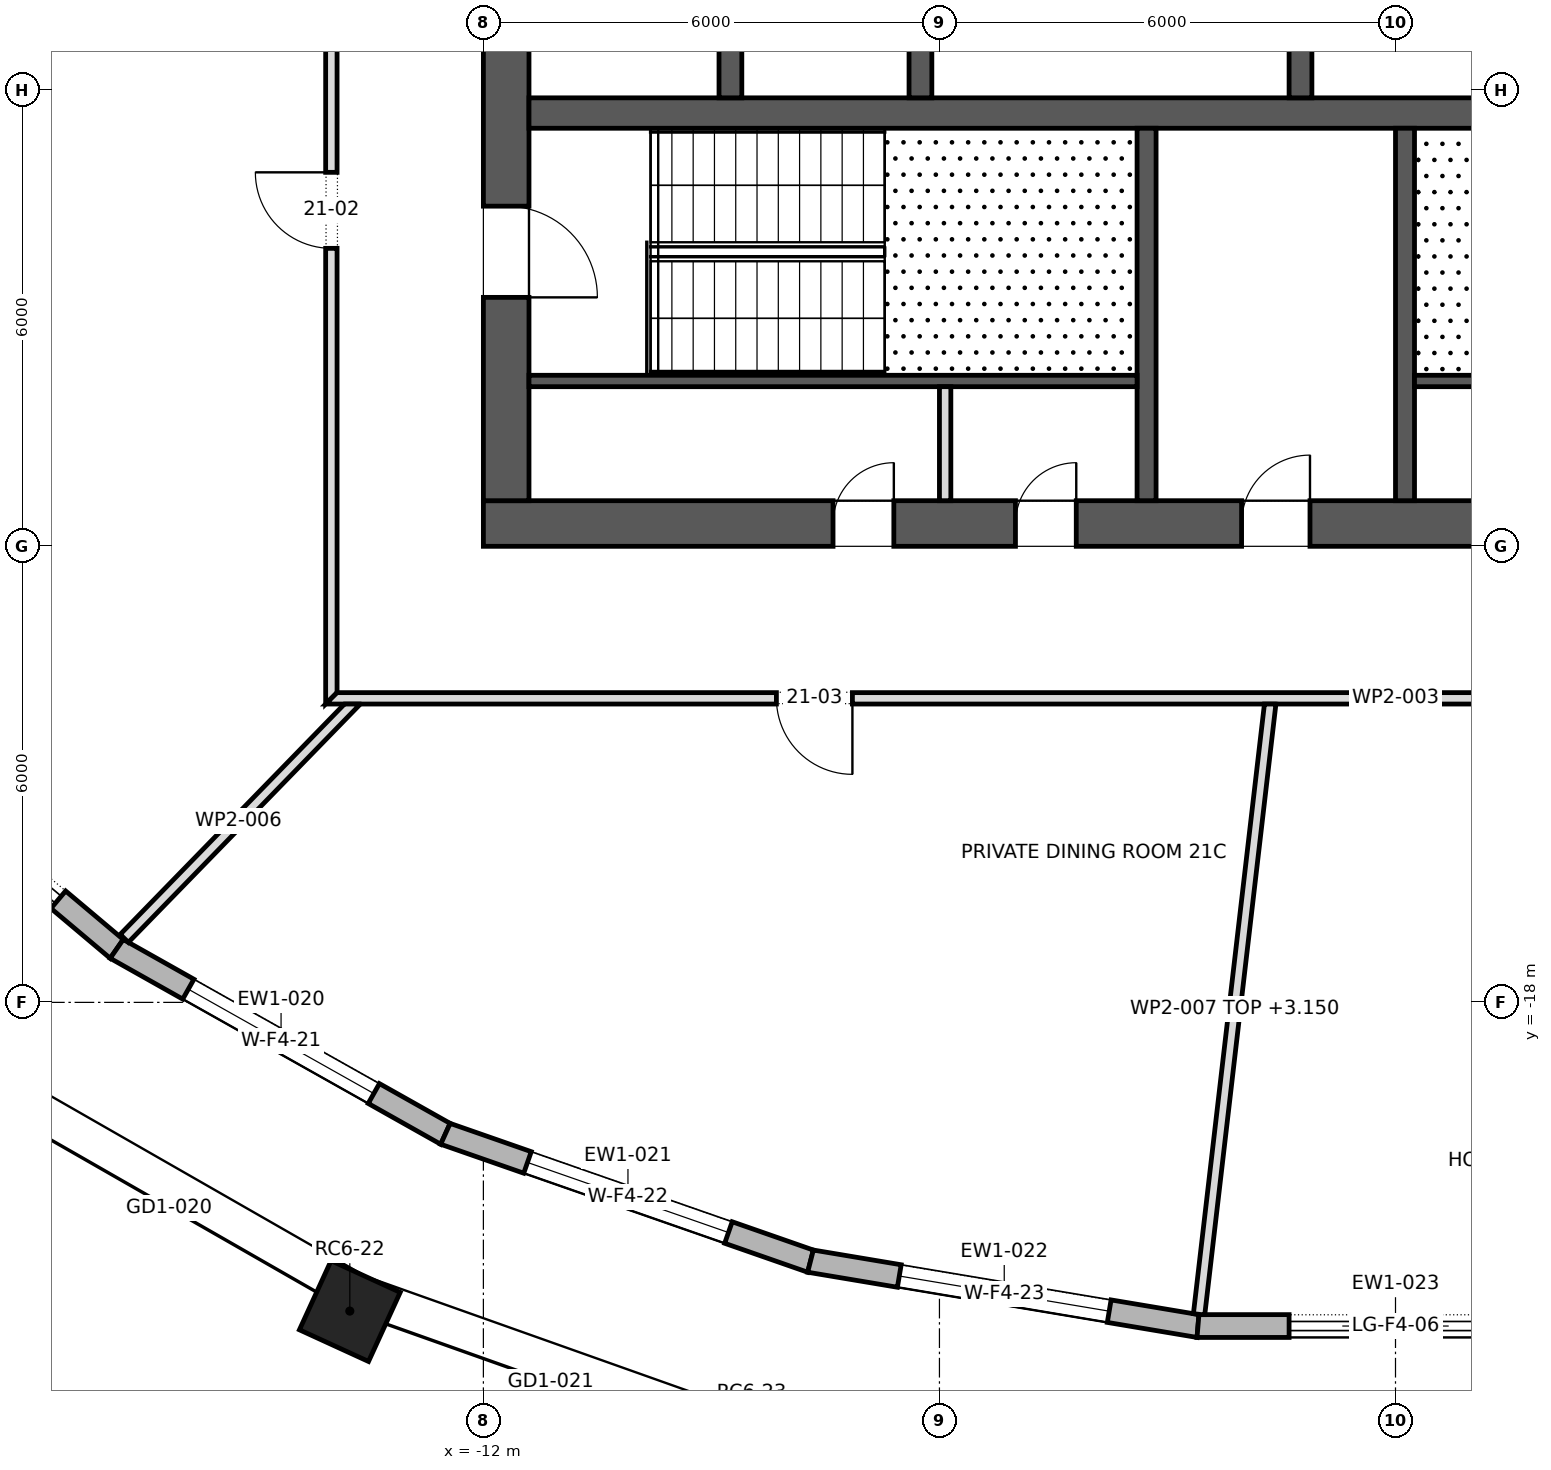
"""IFC4 building model, lengths in metres.
Left out: names, types, materials, properties, quantities, classifications, styles, units other than length and angle.
Written with IfcOpenShell. Run it as: python <this file> out.ifc"""

import sys

from ifc_helpers import new_model, si_unit, direction, frame, frame_2d, origin, origin_2d, place, context, subcontext, project, spatial, polyline, rectangle, outline, extrude, element, fill, save


model = new_model("IFC4")
c1 = context("Model", 3, precision=1e-05, world=origin(), true_north=direction((0.0, 1.0)))
c2 = subcontext(c1, "Body", "Model", "MODEL_VIEW")
j1 = project(units=[si_unit("LENGTHUNIT", "METRE"), si_unit("PLANEANGLEUNIT", "RADIAN")], contexts=[c1])
p1 = place(None, origin())
s1 = spatial("IfcSite", under=j1, at=p1, CompositionType="ELEMENT")
p2 = place(p1, origin())
s2 = spatial("IfcBuilding", under=s1, at=p2, CompositionType="ELEMENT")
p3 = place(p2, frame((0.0, 0.0, 292.3)))
s3 = spatial("IfcBuildingStorey", under=s2, at=p3, CompositionType="ELEMENT", Elevation=292.3)
p4 = place(p3, frame((-13.757, -22.061, 0.0), z_axis=(0.0, 0.0, 1.0), x_axis=(0.909128549752, -0.416515641994, 0.0)))
e1 = element("IfcColumn", 1, at=p4, inside=s3, PredefinedType="COLUMN", context=c2, shape_type="SweptSolid", body=[
    extrude(rectangle(XDim=1.0, YDim=1.0, at=origin_2d()), origin(), (0.0, 0.0, 1.0), 4.0),
])
p5 = place(p3, frame((-12.0, -11.7, 0.0), z_axis=(0.0, 0.0, 1.0), x_axis=(1.0, 0.0, 0.0)))
e2 = element("IfcWall", 2, at=p5, inside=s3, PredefinedType="SHEAR", context=c2, shape_type="SweptSolid", body=[
    extrude(rectangle(XDim=24.0, YDim=0.6, at=frame_2d((12.0, 0.0))), origin(), (0.0, 0.0, 1.0), 4.0),
])
p6 = place(p5, frame((9.975, 0.0, 0.0)))
e3 = element("IfcOpeningElement", 3, at=p6, cuts=e2, PredefinedType="OPENING", context=c2, shape_type="SweptSolid", body=[
    extrude(rectangle(XDim=0.9, YDim=2.1, at=frame_2d((0.45, 1.05))), frame((0.0, 0.312, 0.0), z_axis=(0.0, -1.0, 0.0), x_axis=(1.0, 0.0, 0.0)), (0.0, 0.0, 1.0), 0.624),
])
p7 = place(p5, frame((4.6, 0.0, 0.0)))
e4 = element("IfcOpeningElement", 4, at=p7, cuts=e2, PredefinedType="OPENING", context=c2, shape_type="SweptSolid", body=[
    extrude(rectangle(XDim=0.8, YDim=2.1, at=frame_2d((0.4, 1.05))), frame((0.0, 0.312, 0.0), z_axis=(0.0, -1.0, 0.0), x_axis=(1.0, 0.0, 0.0)), (0.0, 0.0, 1.0), 0.624),
])
p8 = place(p5, frame((7.0, 0.0, 0.0)))
e5 = element("IfcOpeningElement", 5, at=p8, cuts=e2, PredefinedType="OPENING", context=c2, shape_type="SweptSolid", body=[
    extrude(rectangle(XDim=0.8, YDim=2.1, at=frame_2d((0.4, 1.05))), frame((0.0, 0.312, 0.0), z_axis=(0.0, -1.0, 0.0), x_axis=(1.0, 0.0, 0.0)), (0.0, 0.0, 1.0), 0.624),
])
p9 = place(p5, frame((15.85, 0.0, 0.0)))
e6 = element("IfcOpeningElement", 6, at=p9, cuts=e2, PredefinedType="OPENING", context=c2, shape_type="SweptSolid", body=[
    extrude(rectangle(XDim=0.8, YDim=2.1, at=frame_2d((0.4, 1.05))), frame((0.0, 0.312, 0.0), z_axis=(0.0, -1.0, 0.0), x_axis=(1.0, 0.0, 0.0)), (0.0, 0.0, 1.0), 0.624),
])
p10 = place(p3, frame((-11.7, -11.4, 0.0), z_axis=(0.0, 0.0, 1.0), x_axis=(0.0, 1.0, 0.0)))
e7 = element("IfcWall", 7, at=p10, inside=s3, PredefinedType="SHEAR", context=c2, shape_type="SweptSolid", body=[
    extrude(rectangle(XDim=22.8, YDim=0.6, at=frame_2d((11.4, 0.0))), origin(), (0.0, 0.0, 1.0), 4.0),
])
p11 = place(p10, frame((10.2, 0.0, 0.0)))
e8 = element("IfcOpeningElement", 8, at=p11, cuts=e7, PredefinedType="OPENING", context=c2, shape_type="SweptSolid", body=[
    extrude(rectangle(XDim=2.4, YDim=2.1, at=frame_2d((1.2, 1.05))), frame((0.0, 0.312, 0.0), z_axis=(0.0, -1.0, 0.0), x_axis=(1.0, 0.0, 0.0)), (0.0, 0.0, 1.0), 0.624),
])
p12 = place(p10, frame((18.925, 0.0, 0.0)))
e9 = element("IfcOpeningElement", 9, at=p12, cuts=e7, PredefinedType="OPENING", context=c2, shape_type="SweptSolid", body=[
    extrude(rectangle(XDim=1.2, YDim=2.1, at=frame_2d((0.6, 1.05))), frame((0.0, 0.312, 0.0), z_axis=(0.0, -1.0, 0.0), x_axis=(1.0, 0.0, 0.0)), (0.0, 0.0, 1.0), 0.624),
])
p13 = place(p10, frame((2.675, 0.0, 0.0)))
e10 = element("IfcOpeningElement", 10, at=p13, cuts=e7, PredefinedType="OPENING", context=c2, shape_type="SweptSolid", body=[
    extrude(rectangle(XDim=1.2, YDim=2.1, at=frame_2d((0.6, 1.05))), frame((0.0, 0.312, 0.0), z_axis=(0.0, -1.0, 0.0), x_axis=(1.0, 0.0, 0.0)), (0.0, 0.0, 1.0), 0.624),
])
p14 = place(p3, frame((-11.4, -6.3, 0.0), z_axis=(0.0, 0.0, 1.0), x_axis=(1.0, 0.0, 0.0)))
e11 = element("IfcWall", 11, at=p14, inside=s3, PredefinedType="SHEAR", context=c2, shape_type="SweptSolid", body=[
    extrude(rectangle(XDim=22.8, YDim=0.4, at=frame_2d((11.4, 0.0))), origin(), (0.0, 0.0, 1.0), 4.0),
])
p15 = place(p14, frame((20.85, 0.0, 0.0)))
e12 = element("IfcOpeningElement", 12, at=p15, cuts=e11, PredefinedType="OPENING", context=c2, shape_type="SweptSolid", body=[
    extrude(rectangle(XDim=1.1, YDim=2.1, at=frame_2d((0.55, 1.05))), frame((0.0, 0.212, 0.0), z_axis=(0.0, -1.0, 0.0), x_axis=(1.0, 0.0, 0.0)), (0.0, 0.0, 1.0), 0.424),
])
for number, where, z_axis, x_axis in (
    (13, (-8.75, -6.1, 0.0), (0.0, 0.0, 1.0), (0.0, 1.0, 0.0)),
    (14, (-6.25, -6.1, 0.0), (0.0, 0.0, 1.0), (0.0, 1.0, 0.0)),
    (15, (-1.25, -6.1, 0.0), (0.0, 0.0, 1.0), (0.0, 1.0, 0.0)),
):
    element("IfcWall", number, at=place(p3, frame(where, z_axis=z_axis, x_axis=x_axis)), inside=s3, PredefinedType="SHEAR", context=c2, shape_type="SweptSolid", body=[
        extrude(rectangle(XDim=2.9, YDim=0.3, at=frame_2d((1.45, 0.0))), origin(), (0.0, 0.0, 1.0), 4.0),
    ])
p16 = place(p3, frame((-20.503, -14.198, 0.0), z_axis=(0.0, 0.0, 1.0), x_axis=(0.764966473721, -0.644070100286, 0.0)))
e16 = element("IfcWall", 16, at=p16, inside=s3, PredefinedType="STANDARD", context=c2, shape_type="SweptSolid", body=[
    extrude(outline(polyline([(-0.015, -0.15), (4.824, -0.15), (4.796, 0.15), (0.015, 0.15), (-0.015, -0.15)])), origin(), (0.0, 0.0, 1.0), 3.7),
])
p17 = place(p16, frame((1.005, 0.0, 0.0)))
e17 = element("IfcOpeningElement", 17, at=p17, cuts=e16, PredefinedType="OPENING", context=c2, shape_type="SweptSolid", body=[
    extrude(rectangle(XDim=2.8, YDim=3.25, at=frame_2d((1.4, 1.625))), frame((0.0, 0.162, 0.0), z_axis=(0.0, -1.0, 0.0), x_axis=(1.0, 0.0, 0.0)), (0.0, 0.0, 1.0), 0.324),
])
p18 = place(p3, frame((-16.824, -17.296, 0.0), z_axis=(0.0, 0.0, 1.0), x_axis=(0.871512454536, -0.490373369575, 0.0)))
e18 = element("IfcWall", 18, at=p18, inside=s3, PredefinedType="STANDARD", context=c2, shape_type="SweptSolid", body=[
    extrude(outline(polyline([(-0.014, -0.15), (4.975, -0.15), (4.948, 0.15), (0.014, 0.15), (-0.014, -0.15)])), origin(), (0.0, 0.0, 1.0), 3.7),
])
p19 = place(p18, frame((1.081, 0.0, 0.6)))
e19 = element("IfcOpeningElement", 19, at=p19, cuts=e18, PredefinedType="OPENING", context=c2, shape_type="SweptSolid", body=[
    extrude(rectangle(XDim=2.8, YDim=2.65, at=frame_2d((1.4, 1.325))), frame((0.0, 0.162, 0.0), z_axis=(0.0, -1.0, 0.0), x_axis=(1.0, 0.0, 0.0)), (0.0, 0.0, 1.0), 0.324),
])
p20 = place(p3, frame((-12.5, -19.729, 0.0), z_axis=(0.0, 0.0, 1.0), x_axis=(0.944230376095, -0.329285585564, 0.0)))
e20 = element("IfcWall", 20, at=p20, inside=s3, PredefinedType="STANDARD", context=c2, shape_type="SweptSolid", body=[
    extrude(outline(polyline([(-0.013, -0.15), (5.1, -0.15), (5.074, 0.15), (0.013, 0.15), (-0.013, -0.15)])), origin(), (0.0, 0.0, 1.0), 3.7),
])
p21 = place(p20, frame((1.143, 0.0, 0.6)))
e21 = element("IfcOpeningElement", 21, at=p21, cuts=e20, PredefinedType="OPENING", context=c2, shape_type="SweptSolid", body=[
    extrude(rectangle(XDim=2.8, YDim=2.65, at=frame_2d((1.4, 1.325))), frame((0.0, 0.162, 0.0), z_axis=(0.0, -1.0, 0.0), x_axis=(1.0, 0.0, 0.0)), (0.0, 0.0, 1.0), 0.324),
])
p22 = place(p3, frame((-7.696, -21.404, 0.0), z_axis=(0.0, 0.0, 1.0), x_axis=(0.986263399459, -0.165180225475, 0.0)))
e22 = element("IfcWall", 22, at=p22, inside=s3, PredefinedType="STANDARD", context=c2, shape_type="SweptSolid", body=[
    extrude(outline(polyline([(-0.013, -0.15), (5.181, -0.15), (5.156, 0.15), (0.013, 0.15), (-0.013, -0.15)])), origin(), (0.0, 0.0, 1.0), 3.7),
])
p23 = place(p22, frame((1.184, 0.0, 0.6)))
e23 = element("IfcOpeningElement", 23, at=p23, cuts=e22, PredefinedType="OPENING", context=c2, shape_type="SweptSolid", body=[
    extrude(rectangle(XDim=2.8, YDim=2.65, at=frame_2d((1.4, 1.325))), frame((0.0, 0.162, 0.0), z_axis=(0.0, -1.0, 0.0), x_axis=(1.0, 0.0, 0.0)), (0.0, 0.0, 1.0), 0.324),
])
p24 = place(p3, frame((-2.599, -22.258, 0.0), z_axis=(0.0, 0.0, 1.0), x_axis=(1.0, 0.0, 0.0)))
e24 = element("IfcWall", 24, at=p24, inside=s3, PredefinedType="STANDARD", context=c2, shape_type="SweptSolid", body=[
    extrude(outline(polyline([(-0.012, -0.15), (5.21, -0.15), (5.185, 0.15), (0.012, 0.15), (-0.012, -0.15)])), origin(), (0.0, 0.0, 1.0), 3.7),
])
p25 = place(p24, frame((1.198, 0.0, 0.0)))
e25 = element("IfcOpeningElement", 25, at=p25, cuts=e24, PredefinedType="OPENING", context=c2, shape_type="SweptSolid", body=[
    extrude(rectangle(XDim=2.8, YDim=3.25, at=frame_2d((1.4, 1.625))), frame((0.0, 0.162, 0.0), z_axis=(0.0, -1.0, 0.0), x_axis=(1.0, 0.0, 0.0)), (0.0, 0.0, 1.0), 0.324),
])
for number, where, z_axis, x_axis in (
    (26, (-3.275, -11.4, 0.0), (0.0, 0.0, 1.0), (0.0, 1.0, 0.0)),
    (27, (0.125, -11.4, 0.0), (0.0, 0.0, 1.0), (0.0, 1.0, 0.0)),
):
    element("IfcWall", number, at=place(p3, frame(where, z_axis=z_axis, x_axis=x_axis)), inside=s3, PredefinedType="SHEAR", context=c2, shape_type="SweptSolid", body=[
        extrude(rectangle(XDim=4.9, YDim=0.25, at=frame_2d((2.45, 0.0))), origin(), (0.0, 0.0, 1.0), 3.7),
    ])
for number, where, z_axis, x_axis in (
    (28, (-11.4, -9.825, 0.0), (0.0, 0.0, 1.0), (1.0, 0.0, 0.0)),
    (29, (0.25, -9.825, 0.0), (0.0, 0.0, 1.0), (1.0, 0.0, 0.0)),
):
    element("IfcWall", number, at=place(p3, frame(where, z_axis=z_axis, x_axis=x_axis)), inside=s3, PredefinedType="SHEAR", context=c2, shape_type="SweptSolid", body=[
        extrude(rectangle(XDim=8.0, YDim=0.15, at=frame_2d((4.0, 0.0))), origin(), (0.0, 0.0, 1.0), 3.7),
    ])
p26 = place(p3, frame((-5.925, -11.4, 0.0), z_axis=(0.0, 0.0, 1.0), x_axis=(0.0, 1.0, 0.0)))
e30 = element("IfcWall", 30, at=p26, inside=s3, PredefinedType="PARTITIONING", context=c2, shape_type="SweptSolid", body=[
    extrude(rectangle(XDim=1.5, YDim=0.15, at=frame_2d((0.75, 0.0))), origin(), (0.0, 0.0, 1.0), 3.7),
])
p27 = place(p3, frame((-14.0, -14.075, 0.0), z_axis=(0.0, 0.0, 1.0), x_axis=(0.0, 1.0, 0.0)))
e31 = element("IfcWall", 31, at=p27, inside=s3, PredefinedType="PARTITIONING", context=c2, shape_type="SweptSolid", body=[
    extrude(outline(polyline([(0.15, -0.075), (2.139, -0.075), (4.128, -0.075), (6.118, -0.075), (8.107, -0.075), (10.096, -0.075), (12.086, -0.075), (14.075, -0.075), (16.064, -0.075), (18.053, -0.075), (20.043, -0.075), (22.032, -0.075), (24.021, -0.075), (26.011, -0.075), (28.0, -0.075), (28.15, 0.075), (26.273, 0.075), (24.396, 0.075), (22.52, 0.075), (20.643, 0.075), (18.767, 0.075), (16.89, 0.075), (15.013, 0.075), (13.137, 0.075), (11.26, 0.075), (9.383, 0.075), (7.507, 0.075), (5.63, 0.075), (3.753, 0.075), (1.877, 0.075), (0.0, 0.075), (0.15, -0.075)])), origin(), (0.0, 0.0, 1.0), 3.7),
])
p28 = place(p27, frame((17.43, 0.0, 0.0)))
e32 = element("IfcOpeningElement", 32, at=p28, cuts=e31, PredefinedType="OPENING", context=c2, shape_type="SweptSolid", body=[
    extrude(rectangle(XDim=1.8, YDim=2.1, at=frame_2d((0.9, 1.05))), frame((0.0, 0.087, 0.0), z_axis=(0.0, -1.0, 0.0), x_axis=(1.0, 0.0, 0.0)), (0.0, 0.0, 1.0), 0.174),
])
p29 = place(p27, frame((5.995, 0.0, 0.0)))
e33 = element("IfcOpeningElement", 33, at=p29, cuts=e31, PredefinedType="OPENING", context=c2, shape_type="SweptSolid", body=[
    extrude(rectangle(XDim=1.0, YDim=2.1, at=frame_2d((0.5, 1.05))), frame((0.0, 0.087, 0.0), z_axis=(0.0, -1.0, 0.0), x_axis=(1.0, 0.0, 0.0)), (0.0, 0.0, 1.0), 0.174),
])
p30 = place(p3, frame((-14.075, -14.0, 0.0), z_axis=(0.0, 0.0, 1.0), x_axis=(1.0, 0.0, 0.0)))
e34 = element("IfcWall", 34, at=p30, inside=s3, PredefinedType="PARTITIONING", context=c2, shape_type="SweptSolid", body=[
    extrude(outline(polyline([(0.0, -0.075), (1.877, -0.075), (3.753, -0.075), (5.63, -0.075), (7.507, -0.075), (9.383, -0.075), (11.26, -0.075), (13.137, -0.075), (15.013, -0.075), (16.89, -0.075), (18.767, -0.075), (20.643, -0.075), (22.52, -0.075), (24.396, -0.075), (26.273, -0.075), (28.15, -0.075), (28.0, 0.075), (26.011, 0.075), (24.021, 0.075), (22.032, 0.075), (20.043, 0.075), (18.053, 0.075), (16.064, 0.075), (14.075, 0.075), (12.086, 0.075), (10.096, 0.075), (8.107, 0.075), (6.118, 0.075), (4.128, 0.075), (2.139, 0.075), (0.15, 0.075), (0.0, -0.075)])), origin(), (0.0, 0.0, 1.0), 3.7),
])
p31 = place(p30, frame((5.93, 0.0, 0.0)))
e35 = element("IfcOpeningElement", 35, at=p31, cuts=e34, PredefinedType="OPENING", context=c2, shape_type="SweptSolid", body=[
    extrude(rectangle(XDim=1.0, YDim=2.1, at=frame_2d((0.5, 1.05))), frame((0.0, 0.087, 0.0), z_axis=(0.0, -1.0, 0.0), x_axis=(1.0, 0.0, 0.0)), (0.0, 0.0, 1.0), 0.174),
])
p32 = place(p30, frame((17.2, 0.0, 0.0)))
e36 = element("IfcOpeningElement", 36, at=p32, cuts=e34, PredefinedType="OPENING", context=c2, shape_type="SweptSolid", body=[
    extrude(rectangle(XDim=1.0, YDim=2.1, at=frame_2d((0.5, 1.05))), frame((0.0, 0.087, 0.0), z_axis=(0.0, -1.0, 0.0), x_axis=(1.0, 0.0, 0.0)), (0.0, 0.0, 1.0), 0.174),
])
p33 = place(p3, frame((-13.672, -14.023, 0.0), z_axis=(0.0, 0.0, 1.0), x_axis=(-0.697528481307, -0.716557058277, 0.0)))
e37 = element("IfcWall", 37, at=p33, inside=s3, PredefinedType="PARTITIONING", context=c2, shape_type="SweptSolid", body=[
    extrude(outline(polyline([(0.0, 0.075), (0.0, 0.075), (0.146, -0.075), (1.555, -0.075), (2.965, -0.075), (4.375, -0.075), (4.375, 0.075), (2.917, 0.075), (1.458, 0.075), (0.0, 0.075)])), origin(), (0.0, 0.0, 1.0), 3.7),
])
p34 = place(p3, frame((-1.648, -14.066, 0.0), z_axis=(0.0, 0.0, 1.0), x_axis=(-0.115734847025, -0.993280144362, 0.0)))
e38 = element("IfcWall", 38, at=p34, inside=s3, PredefinedType="PARTITIONING", context=c2, shape_type="SweptSolid", body=[
    extrude(outline(polyline([(8.092, -0.075), (8.092, 0.034), (8.087, 0.075), (6.47, 0.075), (4.852, 0.075), (3.235, 0.075), (1.617, 0.075), (0.0, 0.075), (0.0, 0.074), (0.017, -0.075), (1.632, -0.075), (3.247, -0.075), (4.862, -0.075), (6.477, -0.075), (8.092, -0.075)])), origin(), (0.0, 0.0, 1.0), 3.15),
])
p35 = place(p17, origin())
e39 = element("IfcDoor", 39, at=p35, inside=s3, OperationType="DOUBLE_DOOR_SLIDING", PredefinedType="DOOR", context=c2, shape_type="SweptSolid", body=[
    extrude(rectangle(XDim=2.8, YDim=3.25, at=frame_2d((1.4, 1.625))), frame((0.0, 0.025, 0.0), z_axis=(0.0, -1.0, 0.0), x_axis=(1.0, 0.0, 0.0)), (0.0, 0.0, 1.0), 0.05),
])
fill(e17, e39)
p36 = place(p19, origin())
e40 = element("IfcWindow", 40, at=p36, inside=s3, PartitioningType="DOUBLE_PANEL_VERTICAL", PredefinedType="WINDOW", context=c2, shape_type="SweptSolid", body=[
    extrude(rectangle(XDim=2.8, YDim=2.65, at=frame_2d((1.4, 1.325))), frame((0.0, 0.03, 0.0), z_axis=(0.0, -1.0, 0.0), x_axis=(1.0, 0.0, 0.0)), (0.0, 0.0, 1.0), 0.06),
])
fill(e19, e40)
p37 = place(p21, origin())
e41 = element("IfcWindow", 41, at=p37, inside=s3, PartitioningType="DOUBLE_PANEL_VERTICAL", PredefinedType="WINDOW", context=c2, shape_type="SweptSolid", body=[
    extrude(rectangle(XDim=2.8, YDim=2.65, at=frame_2d((1.4, 1.325))), frame((0.0, 0.03, 0.0), z_axis=(0.0, -1.0, 0.0), x_axis=(1.0, 0.0, 0.0)), (0.0, 0.0, 1.0), 0.06),
])
fill(e21, e41)
p38 = place(p23, origin())
e42 = element("IfcWindow", 42, at=p38, inside=s3, PartitioningType="DOUBLE_PANEL_VERTICAL", PredefinedType="WINDOW", context=c2, shape_type="SweptSolid", body=[
    extrude(rectangle(XDim=2.8, YDim=2.65, at=frame_2d((1.4, 1.325))), frame((0.0, 0.03, 0.0), z_axis=(0.0, -1.0, 0.0), x_axis=(1.0, 0.0, 0.0)), (0.0, 0.0, 1.0), 0.06),
])
fill(e23, e42)
p39 = place(p25, origin())
e43 = element("IfcDoor", 43, at=p39, inside=s3, OperationType="DOUBLE_DOOR_SLIDING", PredefinedType="DOOR", context=c2, shape_type="SweptSolid", body=[
    extrude(rectangle(XDim=2.8, YDim=3.25, at=frame_2d((1.4, 1.625))), frame((0.0, 0.025, 0.0), z_axis=(0.0, -1.0, 0.0), x_axis=(1.0, 0.0, 0.0)), (0.0, 0.0, 1.0), 0.05),
])
fill(e25, e43)
p40 = place(p13, frame((1.2, 0.0, 0.0), z_axis=(0.0, 0.0, 1.0), x_axis=(-1.0, 0.0, 0.0)))
e44 = element("IfcDoor", 44, at=p40, inside=s3, OperationType="SINGLE_SWING_LEFT", PredefinedType="DOOR", context=c2, shape_type="SweptSolid", body=[
    extrude(rectangle(XDim=1.2, YDim=2.1, at=frame_2d((0.6, 1.05))), frame((0.0, 0.025, 0.0), z_axis=(0.0, -1.0, 0.0), x_axis=(1.0, 0.0, 0.0)), (0.0, 0.0, 1.0), 0.05),
])
fill(e10, e44)
p41 = place(p6, origin())
e45 = element("IfcDoor", 45, at=p41, inside=s3, OperationType="SINGLE_SWING_LEFT", PredefinedType="DOOR", context=c2, shape_type="SweptSolid", body=[
    extrude(rectangle(XDim=0.9, YDim=2.1, at=frame_2d((0.45, 1.05))), frame((0.0, 0.025, 0.0), z_axis=(0.0, -1.0, 0.0), x_axis=(1.0, 0.0, 0.0)), (0.0, 0.0, 1.0), 0.05),
])
fill(e3, e45)
p42 = place(p7, origin())
e46 = element("IfcDoor", 46, at=p42, inside=s3, OperationType="SINGLE_SWING_LEFT", PredefinedType="DOOR", context=c2, shape_type="SweptSolid", body=[
    extrude(rectangle(XDim=0.8, YDim=2.1, at=frame_2d((0.4, 1.05))), frame((0.0, 0.025, 0.0), z_axis=(0.0, -1.0, 0.0), x_axis=(1.0, 0.0, 0.0)), (0.0, 0.0, 1.0), 0.05),
])
fill(e4, e46)
p43 = place(p8, origin())
e47 = element("IfcDoor", 47, at=p43, inside=s3, OperationType="SINGLE_SWING_LEFT", PredefinedType="DOOR", context=c2, shape_type="SweptSolid", body=[
    extrude(rectangle(XDim=0.8, YDim=2.1, at=frame_2d((0.4, 1.05))), frame((0.0, 0.025, 0.0), z_axis=(0.0, -1.0, 0.0), x_axis=(1.0, 0.0, 0.0)), (0.0, 0.0, 1.0), 0.05),
])
fill(e5, e47)
p44 = place(p29, origin())
e48 = element("IfcDoor", 48, at=p44, inside=s3, OperationType="SINGLE_SWING_LEFT", PredefinedType="DOOR", context=c2, shape_type="SweptSolid", body=[
    extrude(rectangle(XDim=1.0, YDim=2.1, at=frame_2d((0.5, 1.05))), frame((0.0, 0.025, 0.0), z_axis=(0.0, -1.0, 0.0), x_axis=(1.0, 0.0, 0.0)), (0.0, 0.0, 1.0), 0.05),
])
fill(e33, e48)
p45 = place(p31, frame((1.0, 0.0, 0.0), z_axis=(0.0, 0.0, 1.0), x_axis=(-1.0, 0.0, 0.0)))
e49 = element("IfcDoor", 49, at=p45, inside=s3, OperationType="SINGLE_SWING_RIGHT", PredefinedType="DOOR", context=c2, shape_type="SweptSolid", body=[
    extrude(rectangle(XDim=1.0, YDim=2.1, at=frame_2d((0.5, 1.05))), frame((0.0, 0.025, 0.0), z_axis=(0.0, -1.0, 0.0), x_axis=(1.0, 0.0, 0.0)), (0.0, 0.0, 1.0), 0.05),
])
fill(e35, e49)
save(model, sys.argv[1])
